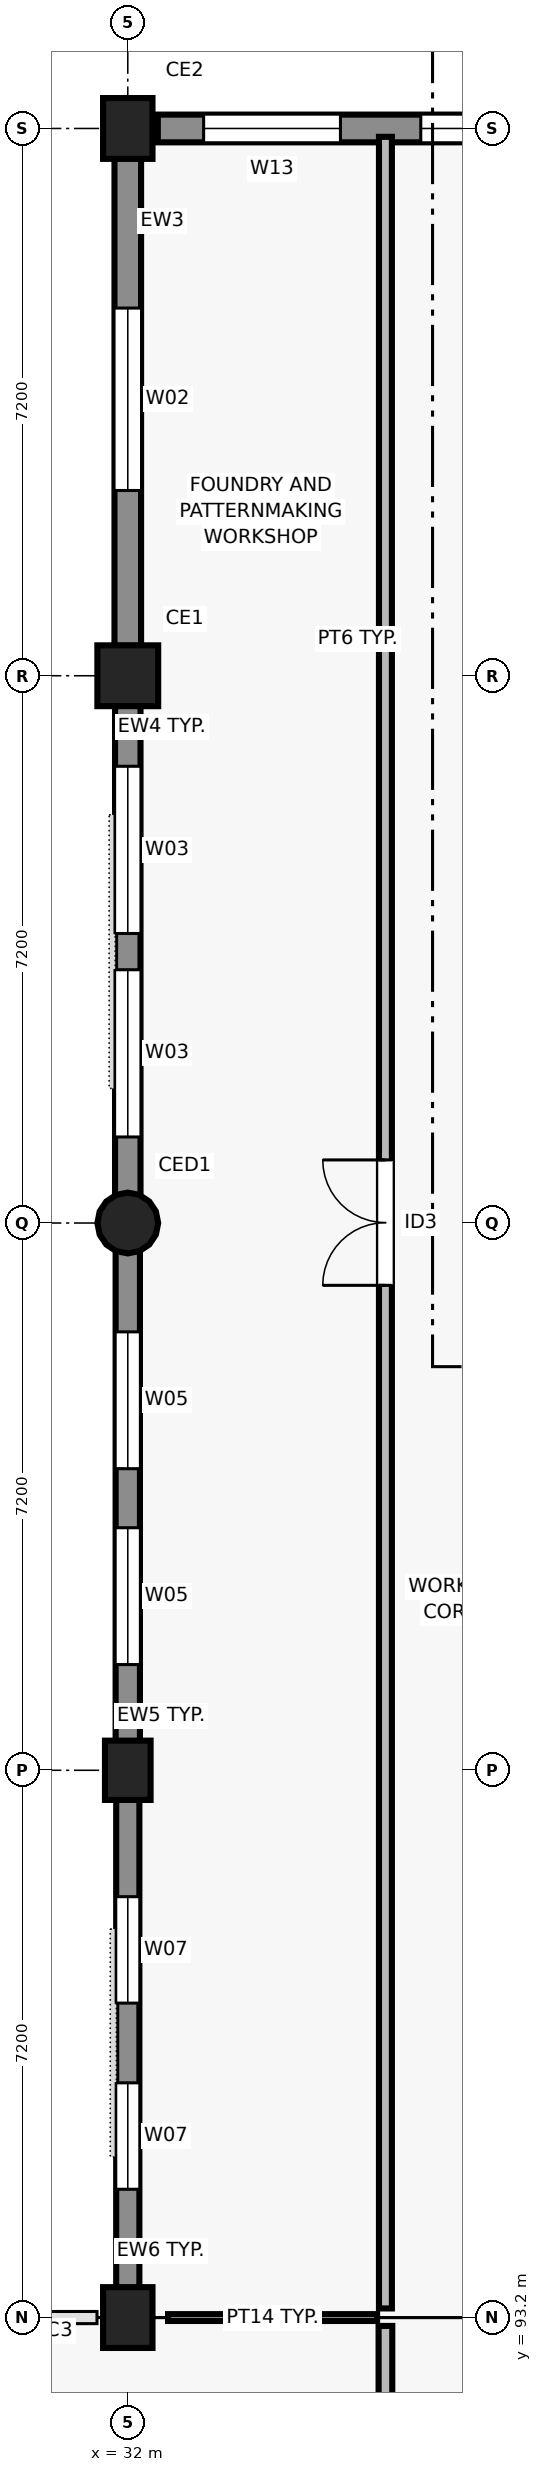
"""IFC4 building model, lengths in metres.
Left out: names, types, materials, properties, quantities, classifications, styles, units other than length and angle.
Written with IfcOpenShell. Run it as: python <this file> out.ifc"""

import sys

from ifc_helpers import new_model, si_unit, direction, frame, frame_2d, origin, origin_2d, place, context, subcontext, project, spatial, rectangle, circle, extrude, element, fill, save


model = new_model("IFC4")
c1 = context("Model", 3, precision=1e-05, world=origin(), true_north=direction((0.0, 1.0)))
c2 = subcontext(c1, "Body", "Model", "MODEL_VIEW")
j1 = project(units=[si_unit("LENGTHUNIT", "METRE"), si_unit("PLANEANGLEUNIT", "RADIAN")], contexts=[c1])
p1 = place(None, origin())
s1 = spatial("IfcSite", under=j1, at=p1, CompositionType="ELEMENT")
p2 = place(p1, origin())
s2 = spatial("IfcBuilding", under=s1, at=p2, CompositionType="ELEMENT")
p3 = place(p2, origin())
s3 = spatial("IfcBuildingStorey", under=s2, at=p3, CompositionType="ELEMENT", Elevation=0.0)
p4 = place(p3, frame((32.0, 93.2, 0.0), z_axis=(0.0, 0.0, 1.0), x_axis=(1.0, 0.0, 0.0)))
e1 = element("IfcColumn", 1, at=p4, inside=s3, PredefinedType="COLUMN", context=c2, shape_type="SweptSolid", body=[
    extrude(rectangle(XDim=0.8, YDim=0.65, at=origin_2d()), origin(), (0.0, 0.0, 1.0), 4.5),
])
p5 = place(p3, frame((32.0, 100.4, 0.0), z_axis=(0.0, 0.0, 1.0), x_axis=(1.0, 0.0, 0.0)))
e2 = element("IfcColumn", 2, at=p5, inside=s3, PredefinedType="COLUMN", context=c2, shape_type="SweptSolid", body=[
    extrude(rectangle(XDim=0.78, YDim=0.6, at=origin_2d()), origin(), (0.0, 0.0, 1.0), 4.5),
])
p6 = place(p3, frame((32.0, 107.6, 0.0), z_axis=(0.0, 0.0, 1.0), x_axis=(1.0, 0.0, 0.0)))
e3 = element("IfcColumn", 3, at=p6, inside=s3, PredefinedType="COLUMN", context=c2, shape_type="SweptSolid", body=[
    extrude(circle(Radius=0.4, at=origin_2d()), origin(), (0.0, 0.0, 1.0), 4.5),
])
p7 = place(p3, frame((32.0, 114.8, 0.0), z_axis=(0.0, 0.0, 1.0), x_axis=(1.0, 0.0, 0.0)))
e4 = element("IfcColumn", 4, at=p7, inside=s3, PredefinedType="COLUMN", context=c2, shape_type="SweptSolid", body=[
    extrude(rectangle(XDim=0.8, YDim=0.8, at=origin_2d()), origin(), (0.0, 0.0, 1.0), 4.5),
])
p8 = place(p3, frame((32.0, 122.0, 0.0), z_axis=(0.0, 0.0, 1.0), x_axis=(1.0, 0.0, 0.0)))
e5 = element("IfcColumn", 5, at=p8, inside=s3, PredefinedType="COLUMN", context=c2, shape_type="SweptSolid", body=[
    extrude(rectangle(XDim=0.8, YDim=0.65, at=origin_2d()), origin(), (0.0, 0.0, 1.0), 4.5),
])
p9 = place(p3, frame((39.615, 122.0, 0.0), z_axis=(0.0, 0.0, 1.0), x_axis=(-1.0, 0.0, 0.0)))
e6 = element("IfcWall", 6, at=p9, inside=s3, PredefinedType="SOLIDWALL", context=c2, shape_type="SweptSolid", body=[
    extrude(rectangle(XDim=7.22, YDim=0.365, at=frame_2d((3.61, 0.0))), origin(), (0.0, 0.0, 1.0), 3.57),
])
p10 = place(p9, frame((1.76, 0.0, 0.9)))
e7 = element("IfcOpeningElement", 7, at=p10, cuts=e6, PredefinedType="OPENING", context=c2, shape_type="SweptSolid", body=[
    extrude(rectangle(XDim=2.0, YDim=1.5, at=frame_2d((1.0, 0.75))), frame((0.0, 0.192, 0.0), z_axis=(0.0, -1.0, 0.0), x_axis=(1.0, 0.0, 0.0)), (0.0, 0.0, 1.0), 0.385),
])
p11 = place(p9, frame((4.817, 0.0, 0.9)))
e8 = element("IfcOpeningElement", 8, at=p11, cuts=e6, PredefinedType="OPENING", context=c2, shape_type="SweptSolid", body=[
    extrude(rectangle(XDim=1.8, YDim=1.5, at=frame_2d((0.9, 0.75))), frame((0.0, 0.192, 0.0), z_axis=(0.0, -1.0, 0.0), x_axis=(1.0, 0.0, 0.0)), (0.0, 0.0, 1.0), 0.385),
])
p12 = place(p3, frame((32.0, 121.68, 0.0), z_axis=(0.0, 0.0, 1.0), x_axis=(0.0, -1.0, 0.0)))
e9 = element("IfcWall", 9, at=p12, inside=s3, PredefinedType="SOLIDWALL", context=c2, shape_type="SweptSolid", body=[
    extrude(rectangle(XDim=6.485, YDim=0.35, at=frame_2d((3.242, 0.0))), origin(), (0.0, 0.0, 1.0), 3.6),
])
p13 = place(p12, frame((2.043, 0.0, 0.9)))
e10 = element("IfcOpeningElement", 10, at=p13, cuts=e9, PredefinedType="OPENING", context=c2, shape_type="SweptSolid", body=[
    extrude(rectangle(XDim=2.4, YDim=1.8, at=frame_2d((1.2, 0.9))), frame((0.0, 0.185, 0.0), z_axis=(0.0, -1.0, 0.0), x_axis=(1.0, 0.0, 0.0)), (0.0, 0.0, 1.0), 0.37),
])
p14 = place(p3, frame((32.0, 114.405, 0.0), z_axis=(0.0, 0.0, 1.0), x_axis=(0.0, -1.0, 0.0)))
e11 = element("IfcWall", 11, at=p14, inside=s3, PredefinedType="SOLIDWALL", context=c2, shape_type="SweptSolid", body=[
    extrude(rectangle(XDim=6.469, YDim=0.335, at=frame_2d((3.234, 0.0))), origin(), (0.0, 0.0, 1.0), 3.78),
])
p15 = place(p14, frame((0.796, 0.0, 0.9)))
e12 = element("IfcOpeningElement", 12, at=p15, cuts=e11, PredefinedType="OPENING", context=c2, shape_type="SweptSolid", body=[
    extrude(rectangle(XDim=2.2, YDim=1.8, at=frame_2d((1.1, 0.9))), frame((0.0, 0.177, 0.0), z_axis=(0.0, -1.0, 0.0), x_axis=(1.0, 0.0, 0.0)), (0.0, 0.0, 1.0), 0.355),
])
p16 = place(p14, frame((3.473, 0.0, 0.9)))
e13 = element("IfcOpeningElement", 13, at=p16, cuts=e11, PredefinedType="OPENING", context=c2, shape_type="SweptSolid", body=[
    extrude(rectangle(XDim=2.2, YDim=1.8, at=frame_2d((1.1, 0.9))), frame((0.0, 0.177, 0.0), z_axis=(0.0, -1.0, 0.0), x_axis=(1.0, 0.0, 0.0)), (0.0, 0.0, 1.0), 0.355),
])
p17 = place(p3, frame((32.0, 107.264, 0.0), z_axis=(0.0, 0.0, 1.0), x_axis=(0.0, -1.0, 0.0)))
e14 = element("IfcWall", 14, at=p17, inside=s3, PredefinedType="SOLIDWALL", context=c2, shape_type="SweptSolid", body=[
    extrude(rectangle(XDim=6.569, YDim=0.32, at=frame_2d((3.284, 0.0))), origin(), (0.0, 0.0, 1.0), 3.76),
])
p18 = place(p17, frame((1.096, 0.0, 0.9)))
e15 = element("IfcOpeningElement", 15, at=p18, cuts=e14, PredefinedType="OPENING", context=c2, shape_type="SweptSolid", body=[
    extrude(rectangle(XDim=1.8, YDim=1.8, at=frame_2d((0.9, 0.9))), frame((0.0, 0.17, 0.0), z_axis=(0.0, -1.0, 0.0), x_axis=(1.0, 0.0, 0.0)), (0.0, 0.0, 1.0), 0.34),
])
p19 = place(p17, frame((3.673, 0.0, 0.9)))
e16 = element("IfcOpeningElement", 16, at=p19, cuts=e14, PredefinedType="OPENING", context=c2, shape_type="SweptSolid", body=[
    extrude(rectangle(XDim=1.8, YDim=1.8, at=frame_2d((0.9, 0.9))), frame((0.0, 0.17, 0.0), z_axis=(0.0, -1.0, 0.0), x_axis=(1.0, 0.0, 0.0)), (0.0, 0.0, 1.0), 0.34),
])
p20 = place(p3, frame((32.0, 100.105, 0.0), z_axis=(0.0, 0.0, 1.0), x_axis=(0.0, -1.0, 0.0)))
e17 = element("IfcWall", 17, at=p20, inside=s3, PredefinedType="SOLIDWALL", context=c2, shape_type="SweptSolid", body=[
    extrude(rectangle(XDim=6.585, YDim=0.305, at=frame_2d((3.292, 0.0))), origin(), (0.0, 0.0, 1.0), 4.22),
])
p21 = place(p20, frame((1.368, 0.0, 0.9)))
e18 = element("IfcOpeningElement", 18, at=p21, cuts=e17, PredefinedType="OPENING", context=c2, shape_type="SweptSolid", body=[
    extrude(rectangle(XDim=1.4, YDim=1.8, at=frame_2d((0.7, 0.9))), frame((0.0, 0.162, 0.0), z_axis=(0.0, -1.0, 0.0), x_axis=(1.0, 0.0, 0.0)), (0.0, 0.0, 1.0), 0.325),
])
p22 = place(p20, frame((3.817, 0.0, 0.9)))
e19 = element("IfcOpeningElement", 19, at=p22, cuts=e17, PredefinedType="OPENING", context=c2, shape_type="SweptSolid", body=[
    extrude(rectangle(XDim=1.4, YDim=1.8, at=frame_2d((0.7, 0.9))), frame((0.0, 0.162, 0.0), z_axis=(0.0, -1.0, 0.0), x_axis=(1.0, 0.0, 0.0)), (0.0, 0.0, 1.0), 0.325),
])
p23 = place(p3, frame((32.53, 93.2, 0.0), z_axis=(0.0, 0.0, 1.0), x_axis=(1.0, 0.0, 0.0)))
e20 = element("IfcWall", 20, at=p23, inside=s3, PredefinedType="PARTITIONING", context=c2, shape_type="SweptSolid", body=[
    extrude(rectangle(XDim=2.75, YDim=0.09, at=frame_2d((1.375, 0.0))), origin(), (0.0, 0.0, 1.0), 4.2),
])
p24 = place(p3, frame((35.39, 74.92, 0.0), z_axis=(0.0, 0.0, 1.0), x_axis=(0.0, 1.0, 0.0)))
e21 = element("IfcWall", 21, at=p24, inside=s3, PredefinedType="PARTITIONING", context=c2, shape_type="SweptSolid", body=[
    extrude(rectangle(XDim=18.17, YDim=0.18, at=frame_2d((9.085, 0.0))), origin(), (0.0, 0.0, 1.0), 4.2),
])
p25 = place(p24, frame((8.285, 0.0, 0.0)))
e22 = element("IfcOpeningElement", 22, at=p25, cuts=e21, PredefinedType="OPENING", context=c2, shape_type="SweptSolid", body=[
    extrude(rectangle(XDim=1.6, YDim=2.25, at=frame_2d((0.8, 1.125))), frame((0.0, 0.1, 0.0), z_axis=(0.0, -1.0, 0.0), x_axis=(1.0, 0.0, 0.0)), (0.0, 0.0, 1.0), 0.2),
])
p26 = place(p3, frame((35.39, 93.32, 0.0), z_axis=(0.0, 0.0, 1.0), x_axis=(0.0, 1.0, 0.0)))
e23 = element("IfcWall", 23, at=p26, inside=s3, PredefinedType="PARTITIONING", context=c2, shape_type="SweptSolid", body=[
    extrude(rectangle(XDim=28.57, YDim=0.17, at=frame_2d((14.285, 0.0))), origin(), (0.0, 0.0, 1.0), 4.2),
])
p27 = place(p26, frame((13.46, 0.0, 0.0)))
e24 = element("IfcOpeningElement", 24, at=p27, cuts=e23, PredefinedType="OPENING", context=c2, shape_type="SweptSolid", body=[
    extrude(rectangle(XDim=1.65, YDim=2.3, at=frame_2d((0.825, 1.15))), frame((0.0, 0.095, 0.0), z_axis=(0.0, -1.0, 0.0), x_axis=(1.0, 0.0, 0.0)), (0.0, 0.0, 1.0), 0.19),
])
p28 = place(p10, origin())
e25 = element("IfcWindow", 25, at=p28, inside=s3, PartitioningType="SINGLE_PANEL", PredefinedType="WINDOW", context=c2, shape_type="SweptSolid", body=[
    extrude(rectangle(XDim=2.0, YDim=1.5, at=frame_2d((1.0, 0.75))), frame((0.0, 0.03, 0.0), z_axis=(0.0, -1.0, 0.0), x_axis=(1.0, 0.0, 0.0)), (0.0, 0.0, 1.0), 0.06),
])
fill(e7, e25)
p29 = place(p11, origin())
e26 = element("IfcWindow", 26, at=p29, inside=s3, PartitioningType="SINGLE_PANEL", PredefinedType="WINDOW", context=c2, shape_type="SweptSolid", body=[
    extrude(rectangle(XDim=1.8, YDim=1.5, at=frame_2d((0.9, 0.75))), frame((0.0, 0.03, 0.0), z_axis=(0.0, -1.0, 0.0), x_axis=(1.0, 0.0, 0.0)), (0.0, 0.0, 1.0), 0.06),
])
fill(e8, e26)
p30 = place(p13, origin())
e27 = element("IfcWindow", 27, at=p30, inside=s3, PartitioningType="SINGLE_PANEL", PredefinedType="WINDOW", context=c2, shape_type="SweptSolid", body=[
    extrude(rectangle(XDim=2.4, YDim=1.8, at=frame_2d((1.2, 0.9))), frame((0.0, 0.03, 0.0), z_axis=(0.0, -1.0, 0.0), x_axis=(1.0, 0.0, 0.0)), (0.0, 0.0, 1.0), 0.06),
])
fill(e10, e27)
p31 = place(p15, origin())
e28 = element("IfcWindow", 28, at=p31, inside=s3, PartitioningType="SINGLE_PANEL", PredefinedType="WINDOW", context=c2, shape_type="SweptSolid", body=[
    extrude(rectangle(XDim=2.2, YDim=1.8, at=frame_2d((1.1, 0.9))), frame((0.0, 0.03, 0.0), z_axis=(0.0, -1.0, 0.0), x_axis=(1.0, 0.0, 0.0)), (0.0, 0.0, 1.0), 0.06),
])
fill(e12, e28)
p32 = place(p16, origin())
e29 = element("IfcWindow", 29, at=p32, inside=s3, PartitioningType="SINGLE_PANEL", PredefinedType="WINDOW", context=c2, shape_type="SweptSolid", body=[
    extrude(rectangle(XDim=2.2, YDim=1.8, at=frame_2d((1.1, 0.9))), frame((0.0, 0.03, 0.0), z_axis=(0.0, -1.0, 0.0), x_axis=(1.0, 0.0, 0.0)), (0.0, 0.0, 1.0), 0.06),
])
fill(e13, e29)
p33 = place(p18, origin())
e30 = element("IfcWindow", 30, at=p33, inside=s3, PartitioningType="SINGLE_PANEL", PredefinedType="WINDOW", context=c2, shape_type="SweptSolid", body=[
    extrude(rectangle(XDim=1.8, YDim=1.8, at=frame_2d((0.9, 0.9))), frame((0.0, 0.03, 0.0), z_axis=(0.0, -1.0, 0.0), x_axis=(1.0, 0.0, 0.0)), (0.0, 0.0, 1.0), 0.06),
])
fill(e15, e30)
p34 = place(p19, origin())
e31 = element("IfcWindow", 31, at=p34, inside=s3, PartitioningType="SINGLE_PANEL", PredefinedType="WINDOW", context=c2, shape_type="SweptSolid", body=[
    extrude(rectangle(XDim=1.8, YDim=1.8, at=frame_2d((0.9, 0.9))), frame((0.0, 0.03, 0.0), z_axis=(0.0, -1.0, 0.0), x_axis=(1.0, 0.0, 0.0)), (0.0, 0.0, 1.0), 0.06),
])
fill(e16, e31)
p35 = place(p21, origin())
e32 = element("IfcWindow", 32, at=p35, inside=s3, PartitioningType="SINGLE_PANEL", PredefinedType="WINDOW", context=c2, shape_type="SweptSolid", body=[
    extrude(rectangle(XDim=1.4, YDim=1.8, at=frame_2d((0.7, 0.9))), frame((0.0, 0.03, 0.0), z_axis=(0.0, -1.0, 0.0), x_axis=(1.0, 0.0, 0.0)), (0.0, 0.0, 1.0), 0.06),
])
fill(e18, e32)
p36 = place(p22, origin())
e33 = element("IfcWindow", 33, at=p36, inside=s3, PartitioningType="SINGLE_PANEL", PredefinedType="WINDOW", context=c2, shape_type="SweptSolid", body=[
    extrude(rectangle(XDim=1.4, YDim=1.8, at=frame_2d((0.7, 0.9))), frame((0.0, 0.03, 0.0), z_axis=(0.0, -1.0, 0.0), x_axis=(1.0, 0.0, 0.0)), (0.0, 0.0, 1.0), 0.06),
])
fill(e19, e33)
p37 = place(p27, origin())
e34 = element("IfcDoor", 34, at=p37, inside=s3, OperationType="DOUBLE_DOOR_SINGLE_SWING", PredefinedType="DOOR", context=c2, shape_type="SweptSolid", body=[
    extrude(rectangle(XDim=1.65, YDim=2.3, at=frame_2d((0.825, 1.15))), frame((0.0, 0.025, 0.0), z_axis=(0.0, -1.0, 0.0), x_axis=(1.0, 0.0, 0.0)), (0.0, 0.0, 1.0), 0.05),
])
fill(e24, e34)
save(model, sys.argv[1])
